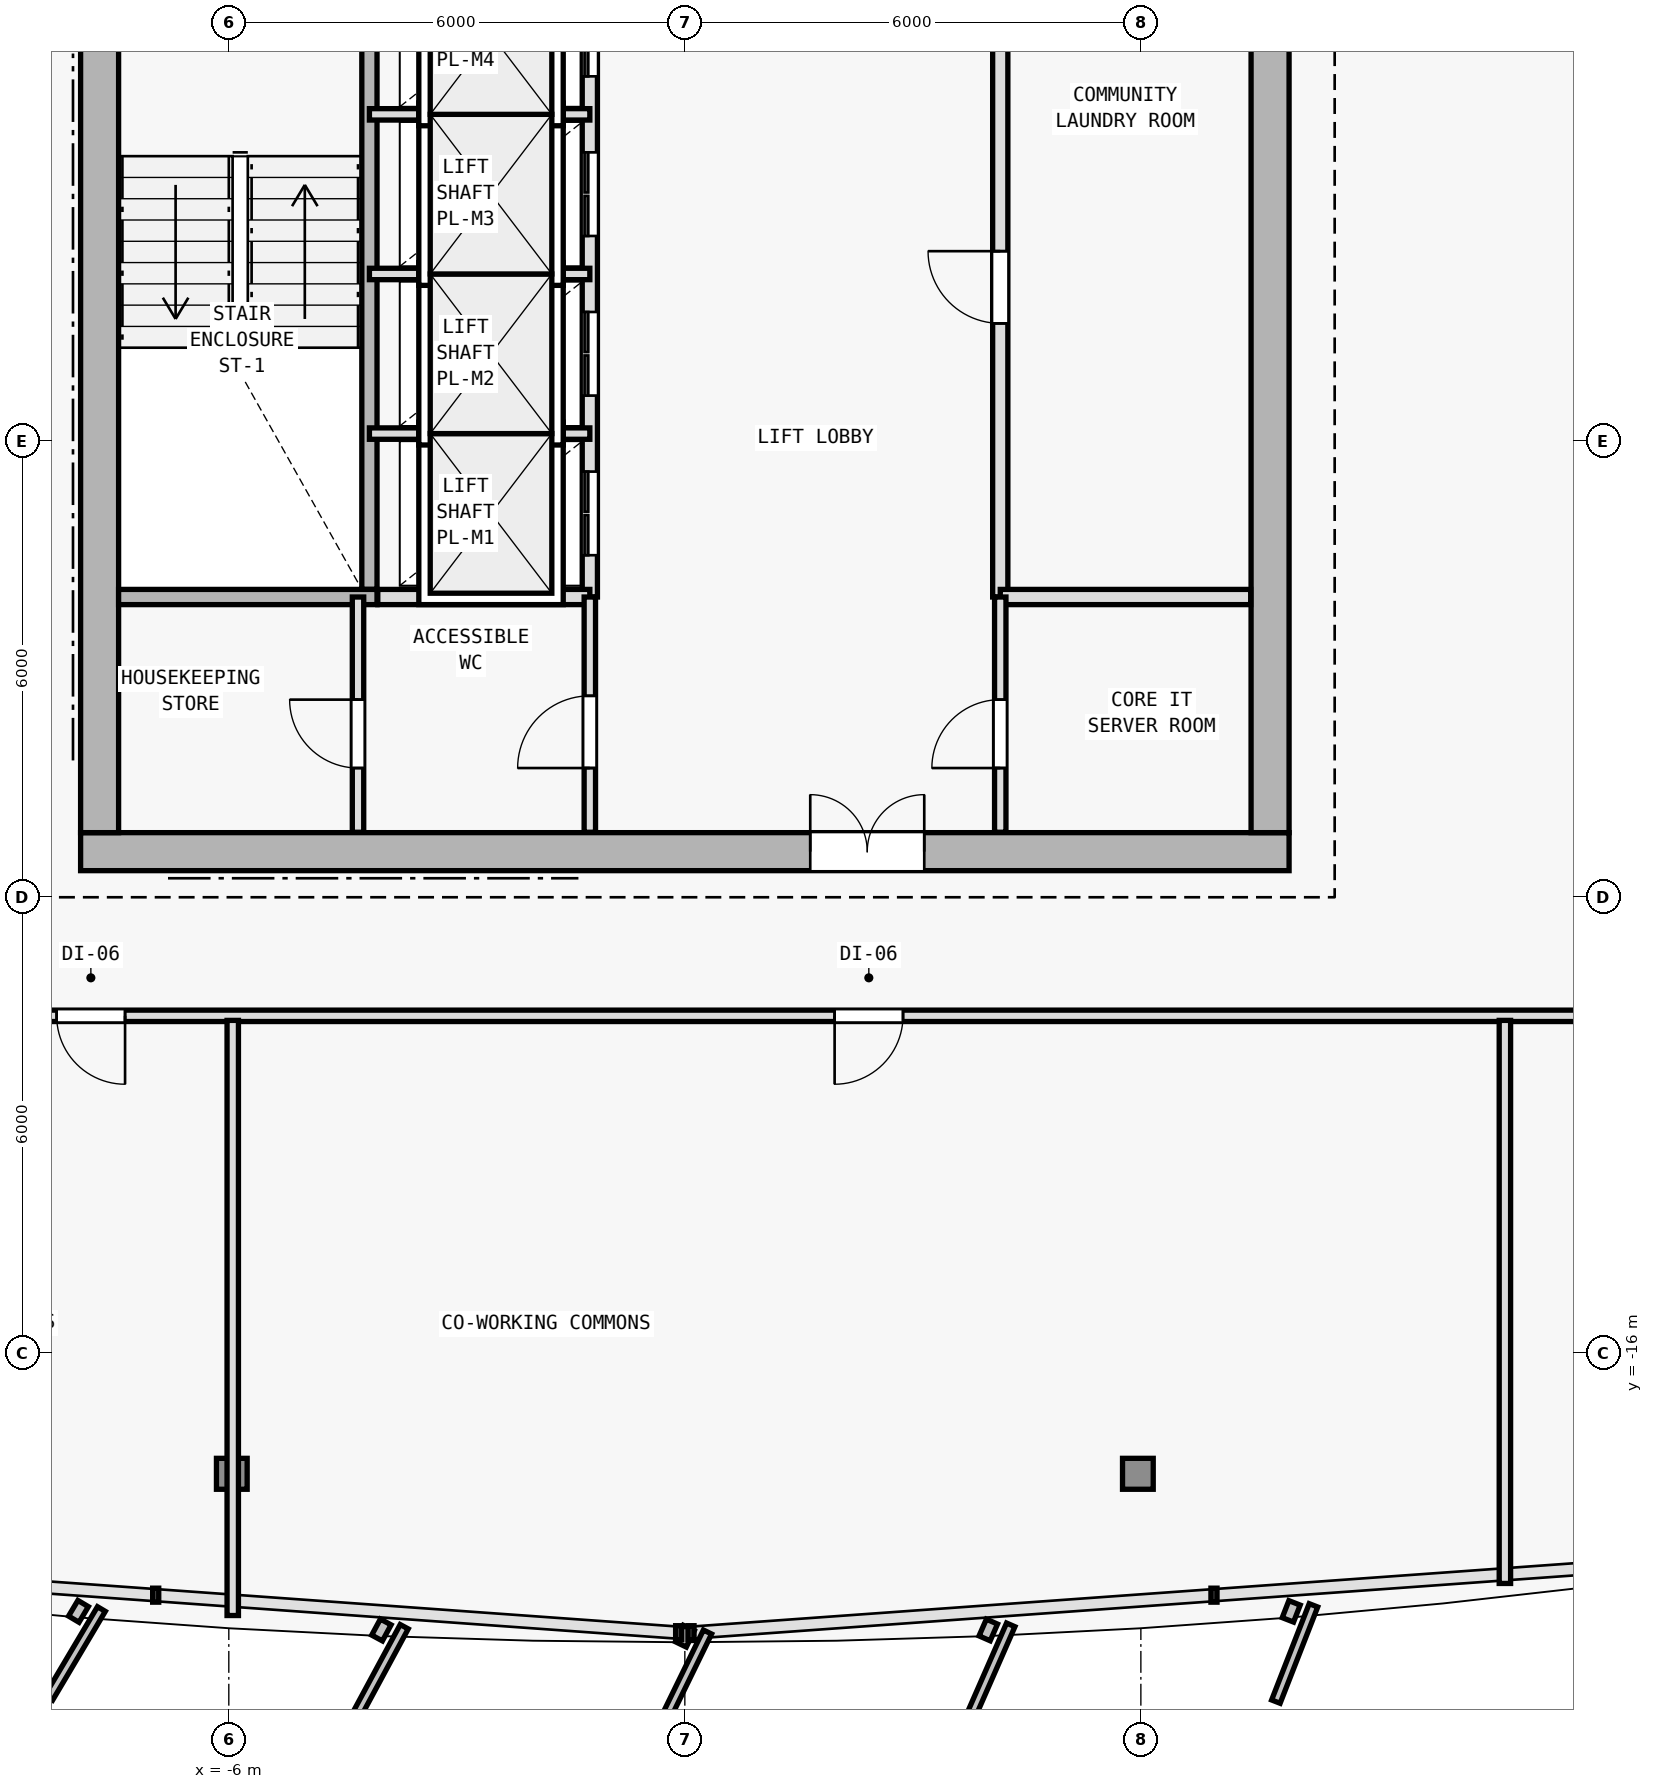
"""IFC4 building model, lengths in metres.
Left out: names, types, materials, properties, quantities, classifications, styles, units other than length and angle.
Written with IfcOpenShell. Run it as: python <this file> out.ifc"""

import sys

from ifc_helpers import new_model, si_unit, direction, frame, frame_2d, origin, origin_2d, place, context, subcontext, project, spatial, rectangle, i_section, extrude, element, fill, save


model = new_model("IFC4")
c1 = context("Model", 3, precision=1e-05, world=origin(), true_north=direction((0.0, 1.0)))
c2 = subcontext(c1, "Body", "Model", "MODEL_VIEW")
j1 = project(units=[si_unit("LENGTHUNIT", "METRE"), si_unit("PLANEANGLEUNIT", "RADIAN")], contexts=[c1])
p1 = place(None, origin())
s1 = spatial("IfcSite", under=j1, at=p1, CompositionType="ELEMENT")
p2 = place(p1, origin())
s2 = spatial("IfcBuilding", under=s1, at=p2, CompositionType="ELEMENT")
p3 = place(p2, frame((0.0, 0.0, 156.6)))
s3 = spatial("IfcBuildingStorey", under=s2, at=p3, CompositionType="ELEMENT", Elevation=156.6)
for number, where, z_axis, x_axis in (
    (1, (-7.7, -9.4, 0.0), (0.0, 0.0, 1.0), (1.0, 0.0, 0.0)),
    (2, (7.7, -9.4, 0.0), (0.0, 0.0, 1.0), (1.0, 0.0, 0.0)),
    (3, (0.0, -9.4, 0.0), (0.0, 0.0, 1.0), (1.0, 0.0, 0.0)),
    (4, (7.7, 0.4, 0.0), (0.0, 0.0, 1.0), (1.0, 0.0, 0.0)),
):
    element("IfcColumn", number, at=place(p3, frame(where, z_axis=z_axis, x_axis=x_axis)), inside=s3, PredefinedType="COLUMN", context=c2, shape_type="SweptSolid", body=[
        extrude(i_section(OverallWidth=0.404, OverallDepth=0.407, WebThickness=0.017, FlangeThickness=0.028, FilletRadius=0.015, at=origin_2d()), origin(), (0.0, 0.0, 1.0), 3.6),
    ])
for number, where, z_axis, x_axis in (
    (5, (-5.961, -17.585, 0.005), (0.007, 0.035, 0.999), (-0.981, 0.193, 0.0)),
    (6, (5.961, -17.585, 0.005), (-0.007, 0.035, 0.999), (-0.981, -0.193, 0.0)),
):
    element("IfcColumn", number, at=place(p3, frame(where, z_axis=z_axis, x_axis=x_axis)), inside=s3, PredefinedType="COLUMN", context=c2, shape_type="SweptSolid", body=[
        extrude(i_section(OverallWidth=0.404, OverallDepth=0.407, WebThickness=0.017, FlangeThickness=0.028, FilletRadius=0.015, at=origin_2d()), origin(), (0.0, 0.0, 1.0), 3.592),
    ])
p4 = place(p3, frame((-7.95, -9.4, 0.0), z_axis=(0.0, 0.0, 1.0), x_axis=(1.0, 0.0, 0.0)))
e7 = element("IfcWall", 7, at=p4, inside=s3, PredefinedType="SHEAR", context=c2, shape_type="SweptSolid", body=[
    extrude(rectangle(XDim=15.9, YDim=0.5, at=frame_2d((7.95, 0.0))), origin(), (0.0, 0.0, 1.0), 3.35),
])
p5 = place(p4, frame((9.6, 0.0, 0.0)))
e8 = element("IfcOpeningElement", 8, at=p5, cuts=e7, PredefinedType="OPENING", context=c2, shape_type="SweptSolid", body=[
    extrude(rectangle(XDim=1.5, YDim=2.2, at=frame_2d((0.75, 1.1))), frame((0.0, 0.26, 0.0), z_axis=(0.0, -1.0, 0.0), x_axis=(1.0, 0.0, 0.0)), (0.0, 0.0, 1.0), 0.52),
])
p6 = place(p3, frame((-7.7, -9.15, 0.0), z_axis=(0.0, 0.0, 1.0), x_axis=(0.0, 1.0, 0.0)))
e9 = element("IfcWall", 9, at=p6, inside=s3, PredefinedType="SHEAR", context=c2, shape_type="SweptSolid", body=[
    extrude(rectangle(XDim=19.1, YDim=0.5, at=frame_2d((9.55, 0.0))), origin(), (0.0, 0.0, 1.0), 3.35),
])
p7 = place(p6, frame((12.7, 0.0, 0.0)))
e10 = element("IfcOpeningElement", 10, at=p7, cuts=e9, PredefinedType="OPENING", context=c2, shape_type="SweptSolid", body=[
    extrude(rectangle(XDim=1.1, YDim=2.15, at=frame_2d((0.55, 1.075))), frame((0.0, 0.26, 0.0), z_axis=(0.0, -1.0, 0.0), x_axis=(1.0, 0.0, 0.0)), (0.0, 0.0, 1.0), 0.52),
])
p8 = place(p3, frame((7.7, 9.95, 0.0), z_axis=(0.0, 0.0, 1.0), x_axis=(0.0, -1.0, 0.0)))
e11 = element("IfcWall", 11, at=p8, inside=s3, PredefinedType="SHEAR", context=c2, shape_type="SweptSolid", body=[
    extrude(rectangle(XDim=19.1, YDim=0.5, at=frame_2d((9.55, 0.0))), origin(), (0.0, 0.0, 1.0), 3.35),
])
p9 = place(p3, frame((-4.15, -5.95, 0.0), z_axis=(0.0, 0.0, 1.0), x_axis=(0.0, 1.0, 0.0)))
e12 = element("IfcWall", 12, at=p9, inside=s3, PredefinedType="SOLIDWALL", context=c2, shape_type="SweptSolid", body=[
    extrude(rectangle(XDim=7.2, YDim=0.2, at=frame_2d((3.6, 0.0))), origin(), (0.0, 0.0, 1.0), 3.35),
])
p10 = place(p3, frame((4.15, -6.05, 0.0), z_axis=(0.0, 0.0, 1.0), x_axis=(0.0, 1.0, 0.0)))
e13 = element("IfcWall", 13, at=p10, inside=s3, PredefinedType="SOLIDWALL", context=c2, shape_type="SweptSolid", body=[
    extrude(rectangle(XDim=8.7, YDim=0.2, at=frame_2d((4.35, 0.0))), origin(), (0.0, 0.0, 1.0), 3.35),
])
p11 = place(p10, frame((3.6, 0.0, 0.0)))
e14 = element("IfcOpeningElement", 14, at=p11, cuts=e13, PredefinedType="OPENING", context=c2, shape_type="SweptSolid", body=[
    extrude(rectangle(XDim=0.95, YDim=2.1, at=frame_2d((0.475, 1.05))), frame((0.0, 0.11, 0.0), z_axis=(0.0, -1.0, 0.0), x_axis=(1.0, 0.0, 0.0)), (0.0, 0.0, 1.0), 0.22),
])
p12 = place(p3, frame((-1.25, -6.05, 0.0), z_axis=(0.0, 0.0, 1.0), x_axis=(0.0, 1.0, 0.0)))
e15 = element("IfcWall", 15, at=p12, inside=s3, PredefinedType="SOLIDWALL", context=c2, shape_type="SweptSolid", body=[
    extrude(rectangle(XDim=8.7, YDim=0.2, at=frame_2d((4.35, 0.0))), origin(), (0.0, 0.0, 1.0), 3.35),
])
p13 = place(p12, frame((0.55, 0.0, 0.0)))
e16 = element("IfcOpeningElement", 16, at=p13, cuts=e15, PredefinedType="OPENING", context=c2, shape_type="SweptSolid", body=[
    extrude(rectangle(XDim=1.1, YDim=2.15, at=frame_2d((0.55, 1.075))), frame((0.0, 0.11, 0.0), z_axis=(0.0, -1.0, 0.0), x_axis=(1.0, 0.0, 0.0)), (0.0, 0.0, 1.0), 0.22),
])
p14 = place(p12, frame((2.65, 0.0, 0.0)))
e17 = element("IfcOpeningElement", 17, at=p14, cuts=e15, PredefinedType="OPENING", context=c2, shape_type="SweptSolid", body=[
    extrude(rectangle(XDim=1.1, YDim=2.15, at=frame_2d((0.55, 1.075))), frame((0.0, 0.11, 0.0), z_axis=(0.0, -1.0, 0.0), x_axis=(1.0, 0.0, 0.0)), (0.0, 0.0, 1.0), 0.22),
])
p15 = place(p12, frame((4.75, 0.0, 0.0)))
e18 = element("IfcOpeningElement", 18, at=p15, cuts=e15, PredefinedType="OPENING", context=c2, shape_type="SweptSolid", body=[
    extrude(rectangle(XDim=1.1, YDim=2.15, at=frame_2d((0.55, 1.075))), frame((0.0, 0.11, 0.0), z_axis=(0.0, -1.0, 0.0), x_axis=(1.0, 0.0, 0.0)), (0.0, 0.0, 1.0), 0.22),
])
p16 = place(p12, frame((6.85, 0.0, 0.0)))
e19 = element("IfcOpeningElement", 19, at=p16, cuts=e15, PredefinedType="OPENING", context=c2, shape_type="SweptSolid", body=[
    extrude(rectangle(XDim=1.1, YDim=2.15, at=frame_2d((0.55, 1.075))), frame((0.0, 0.11, 0.0), z_axis=(0.0, -1.0, 0.0), x_axis=(1.0, 0.0, 0.0)), (0.0, 0.0, 1.0), 0.22),
])
for number, where, z_axis, x_axis in (
    (20, (-4.15, -3.9, 0.0), (0.0, 0.0, 1.0), (1.0, 0.0, 0.0)),
    (21, (-4.15, -1.8, 0.0), (0.0, 0.0, 1.0), (1.0, 0.0, 0.0)),
    (22, (-4.15, 0.3, 0.0), (0.0, 0.0, 1.0), (1.0, 0.0, 0.0)),
):
    element("IfcWall", number, at=place(p3, frame(where, z_axis=z_axis, x_axis=x_axis)), inside=s3, PredefinedType="PARTITIONING", context=c2, shape_type="SweptSolid", body=[
        extrude(rectangle(XDim=2.9, YDim=0.15, at=frame_2d((1.45, 0.0))), origin(), (0.0, 0.0, 1.0), 3.35),
    ])
p17 = place(p3, frame((-7.45, -6.05, 0.0), z_axis=(0.0, 0.0, 1.0), x_axis=(1.0, 0.0, 0.0)))
e23 = element("IfcWall", 23, at=p17, inside=s3, PredefinedType="SOLIDWALL", context=c2, shape_type="SweptSolid", body=[
    extrude(rectangle(XDim=3.4, YDim=0.2, at=frame_2d((1.7, 0.0))), origin(), (0.0, 0.0, 1.0), 3.35),
])
p18 = place(p3, frame((-4.04, -6.05, 0.0), z_axis=(0.0, 0.0, 1.0), x_axis=(1.0, 0.0, 0.0)))
e24 = element("IfcWall", 24, at=p18, inside=s3, PredefinedType="SOLIDWALL", context=c2, shape_type="SweptSolid", body=[
    extrude(rectangle(XDim=2.79, YDim=0.2, at=frame_2d((1.395, 0.0))), origin(), (0.0, 0.0, 1.0), 3.35),
])
p19 = place(p3, frame((4.15, -6.05, 0.0), z_axis=(0.0, 0.0, 1.0), x_axis=(1.0, 0.0, 0.0)))
e25 = element("IfcWall", 25, at=p19, inside=s3, PredefinedType="SOLIDWALL", context=c2, shape_type="SweptSolid", body=[
    extrude(rectangle(XDim=3.295, YDim=0.2, at=frame_2d((1.647, 0.0))), origin(), (0.0, 0.0, 1.0), 3.35),
])
p20 = place(p3, frame((-1.25, -9.145, 0.0), z_axis=(0.0, 0.0, 1.0), x_axis=(0.0, 1.0, 0.0)))
e26 = element("IfcWall", 26, at=p20, inside=s3, PredefinedType="PARTITIONING", context=c2, shape_type="SweptSolid", body=[
    extrude(rectangle(XDim=3.095, YDim=0.15, at=frame_2d((1.547, 0.0))), origin(), (0.0, 0.0, 1.0), 3.35),
])
p21 = place(p20, frame((0.845, 0.0, 0.0)))
e27 = element("IfcOpeningElement", 27, at=p21, cuts=e26, PredefinedType="OPENING", context=c2, shape_type="SweptSolid", body=[
    extrude(rectangle(XDim=0.95, YDim=2.1, at=frame_2d((0.475, 1.05))), frame((0.0, 0.085, 0.0), z_axis=(0.0, -1.0, 0.0), x_axis=(1.0, 0.0, 0.0)), (0.0, 0.0, 1.0), 0.17),
])
p22 = place(p3, frame((4.15, -9.145, 0.0), z_axis=(0.0, 0.0, 1.0), x_axis=(0.0, 1.0, 0.0)))
e28 = element("IfcWall", 28, at=p22, inside=s3, PredefinedType="PARTITIONING", context=c2, shape_type="SweptSolid", body=[
    extrude(rectangle(XDim=3.095, YDim=0.15, at=frame_2d((1.547, 0.0))), origin(), (0.0, 0.0, 1.0), 3.35),
])
p23 = place(p22, frame((0.845, 0.0, 0.0)))
e29 = element("IfcOpeningElement", 29, at=p23, cuts=e28, PredefinedType="OPENING", context=c2, shape_type="SweptSolid", body=[
    extrude(rectangle(XDim=0.9, YDim=2.1, at=frame_2d((0.45, 1.05))), frame((0.0, 0.085, 0.0), z_axis=(0.0, -1.0, 0.0), x_axis=(1.0, 0.0, 0.0)), (0.0, 0.0, 1.0), 0.17),
])
p24 = place(p3, frame((-4.3, -9.145, 0.0), z_axis=(0.0, 0.0, 1.0), x_axis=(0.0, 1.0, 0.0)))
e30 = element("IfcWall", 30, at=p24, inside=s3, PredefinedType="PARTITIONING", context=c2, shape_type="SweptSolid", body=[
    extrude(rectangle(XDim=3.095, YDim=0.15, at=frame_2d((1.547, 0.0))), origin(), (0.0, 0.0, 1.0), 3.35),
])
p25 = place(p24, frame((0.845, 0.0, 0.0)))
e31 = element("IfcOpeningElement", 31, at=p25, cuts=e30, PredefinedType="OPENING", context=c2, shape_type="SweptSolid", body=[
    extrude(rectangle(XDim=0.9, YDim=2.1, at=frame_2d((0.45, 1.05))), frame((0.0, 0.085, 0.0), z_axis=(0.0, -1.0, 0.0), x_axis=(1.0, 0.0, 0.0)), (0.0, 0.0, 1.0), 0.17),
])
p26 = place(p3, frame((13.18, -11.56, 0.0), z_axis=(0.0, 0.0, 1.0), x_axis=(-1.0, 0.0, 0.0)))
e32 = element("IfcWall", 32, at=p26, inside=s3, PredefinedType="PARTITIONING", context=c2, shape_type="SweptSolid", body=[
    extrude(rectangle(XDim=23.04, YDim=0.15, at=frame_2d((11.52, 0.0))), origin(), (0.0, 0.0, 1.0), 2.775),
])
p27 = place(p26, frame((20.545, 0.0, 0.0)))
e33 = element("IfcOpeningElement", 33, at=p27, cuts=e32, PredefinedType="OPENING", context=c2, shape_type="SweptSolid", body=[
    extrude(rectangle(XDim=0.9, YDim=2.1, at=frame_2d((0.45, 1.05))), frame((0.0, 0.085, 0.0), z_axis=(0.0, -1.0, 0.0), x_axis=(1.0, 0.0, 0.0)), (0.0, 0.0, 1.0), 0.17),
])
p28 = place(p26, frame((10.309, 0.0, 0.0)))
e34 = element("IfcOpeningElement", 34, at=p28, cuts=e32, PredefinedType="OPENING", context=c2, shape_type="SweptSolid", body=[
    extrude(rectangle(XDim=0.9, YDim=2.1, at=frame_2d((0.45, 1.05))), frame((0.0, 0.085, 0.0), z_axis=(0.0, -1.0, 0.0), x_axis=(1.0, 0.0, 0.0)), (0.0, 0.0, 1.0), 0.17),
])
p29 = place(p3, frame((-5.948, -11.62, 0.0), z_axis=(0.0, 0.0, 1.0), x_axis=(0.0, -1.0, 0.0)))
e35 = element("IfcWall", 35, at=p29, inside=s3, PredefinedType="PARTITIONING", context=c2, shape_type="SweptSolid", body=[
    extrude(rectangle(XDim=7.83, YDim=0.15, at=frame_2d((3.915, 0.0))), origin(), (0.0, 0.0, 1.0), 2.775),
])
p30 = place(p3, frame((10.79, -11.62, 0.0), z_axis=(0.0, 0.0, 1.0), x_axis=(0.0, -1.0, 0.0)))
e36 = element("IfcWall", 36, at=p30, inside=s3, PredefinedType="PARTITIONING", context=c2, shape_type="SweptSolid", body=[
    extrude(rectangle(XDim=7.407, YDim=0.15, at=frame_2d((3.704, 0.0))), origin(), (0.0, 0.0, 1.0), 2.725),
])
p31 = place(p5, origin())
e37 = element("IfcDoor", 37, at=p31, inside=s3, OperationType="DOUBLE_DOOR_SINGLE_SWING", PredefinedType="DOOR", context=c2, shape_type="SweptSolid", body=[
    extrude(rectangle(XDim=1.5, YDim=2.2, at=frame_2d((0.75, 1.1))), frame((0.0, 0.025, 0.0), z_axis=(0.0, -1.0, 0.0), x_axis=(1.0, 0.0, 0.0)), (0.0, 0.0, 1.0), 0.05),
])
fill(e8, e37)
p32 = place(p11, origin())
e38 = element("IfcDoor", 38, at=p32, inside=s3, OperationType="SINGLE_SWING_RIGHT", PredefinedType="DOOR", context=c2, shape_type="SweptSolid", body=[
    extrude(rectangle(XDim=0.95, YDim=2.1, at=frame_2d((0.475, 1.05))), frame((0.0, 0.025, 0.0), z_axis=(0.0, -1.0, 0.0), x_axis=(1.0, 0.0, 0.0)), (0.0, 0.0, 1.0), 0.05),
])
fill(e14, e38)
p33 = place(p13, origin())
e39 = element("IfcDoor", 39, at=p33, inside=s3, OperationType="DOUBLE_DOOR_SLIDING", PredefinedType="DOOR", context=c2, shape_type="SweptSolid", body=[
    extrude(rectangle(XDim=1.1, YDim=2.15, at=frame_2d((0.55, 1.075))), frame((0.0, 0.025, 0.0), z_axis=(0.0, -1.0, 0.0), x_axis=(1.0, 0.0, 0.0)), (0.0, 0.0, 1.0), 0.05),
])
fill(e16, e39)
p34 = place(p14, origin())
e40 = element("IfcDoor", 40, at=p34, inside=s3, OperationType="DOUBLE_DOOR_SLIDING", PredefinedType="DOOR", context=c2, shape_type="SweptSolid", body=[
    extrude(rectangle(XDim=1.1, YDim=2.15, at=frame_2d((0.55, 1.075))), frame((0.0, 0.025, 0.0), z_axis=(0.0, -1.0, 0.0), x_axis=(1.0, 0.0, 0.0)), (0.0, 0.0, 1.0), 0.05),
])
fill(e17, e40)
p35 = place(p15, origin())
e41 = element("IfcDoor", 41, at=p35, inside=s3, OperationType="DOUBLE_DOOR_SLIDING", PredefinedType="DOOR", context=c2, shape_type="SweptSolid", body=[
    extrude(rectangle(XDim=1.1, YDim=2.15, at=frame_2d((0.55, 1.075))), frame((0.0, 0.025, 0.0), z_axis=(0.0, -1.0, 0.0), x_axis=(1.0, 0.0, 0.0)), (0.0, 0.0, 1.0), 0.05),
])
fill(e18, e41)
p36 = place(p16, origin())
e42 = element("IfcDoor", 42, at=p36, inside=s3, OperationType="DOUBLE_DOOR_SLIDING", PredefinedType="DOOR", context=c2, shape_type="SweptSolid", body=[
    extrude(rectangle(XDim=1.1, YDim=2.15, at=frame_2d((0.55, 1.075))), frame((0.0, 0.025, 0.0), z_axis=(0.0, -1.0, 0.0), x_axis=(1.0, 0.0, 0.0)), (0.0, 0.0, 1.0), 0.05),
])
fill(e19, e42)
p37 = place(p21, origin())
e43 = element("IfcDoor", 43, at=p37, inside=s3, OperationType="SINGLE_SWING_LEFT", PredefinedType="DOOR", context=c2, shape_type="SweptSolid", body=[
    extrude(rectangle(XDim=0.95, YDim=2.1, at=frame_2d((0.475, 1.05))), frame((0.0, 0.025, 0.0), z_axis=(0.0, -1.0, 0.0), x_axis=(1.0, 0.0, 0.0)), (0.0, 0.0, 1.0), 0.05),
])
fill(e27, e43)
p38 = place(p25, origin())
e44 = element("IfcDoor", 44, at=p38, inside=s3, OperationType="SINGLE_SWING_RIGHT", PredefinedType="DOOR", context=c2, shape_type="SweptSolid", body=[
    extrude(rectangle(XDim=0.9, YDim=2.1, at=frame_2d((0.45, 1.05))), frame((0.0, 0.025, 0.0), z_axis=(0.0, -1.0, 0.0), x_axis=(1.0, 0.0, 0.0)), (0.0, 0.0, 1.0), 0.05),
])
fill(e31, e44)
p39 = place(p23, origin())
e45 = element("IfcDoor", 45, at=p39, inside=s3, OperationType="SINGLE_SWING_LEFT", PredefinedType="DOOR", context=c2, shape_type="SweptSolid", body=[
    extrude(rectangle(XDim=0.9, YDim=2.1, at=frame_2d((0.45, 1.05))), frame((0.0, 0.025, 0.0), z_axis=(0.0, -1.0, 0.0), x_axis=(1.0, 0.0, 0.0)), (0.0, 0.0, 1.0), 0.05),
])
fill(e29, e45)
p40 = place(p27, origin())
e46 = element("IfcDoor", 46, at=p40, inside=s3, OperationType="SINGLE_SWING_LEFT", PredefinedType="DOOR", context=c2, shape_type="SweptSolid", body=[
    extrude(rectangle(XDim=0.9, YDim=2.1, at=frame_2d((0.45, 1.05))), frame((0.0, 0.025, 0.0), z_axis=(0.0, -1.0, 0.0), x_axis=(1.0, 0.0, 0.0)), (0.0, 0.0, 1.0), 0.05),
])
fill(e33, e46)
p41 = place(p28, origin())
e47 = element("IfcDoor", 47, at=p41, inside=s3, OperationType="SINGLE_SWING_RIGHT", PredefinedType="DOOR", context=c2, shape_type="SweptSolid", body=[
    extrude(rectangle(XDim=0.9, YDim=2.1, at=frame_2d((0.45, 1.05))), frame((0.0, 0.025, 0.0), z_axis=(0.0, -1.0, 0.0), x_axis=(1.0, 0.0, 0.0)), (0.0, 0.0, 1.0), 0.05),
])
fill(e34, e47)
save(model, sys.argv[1])
